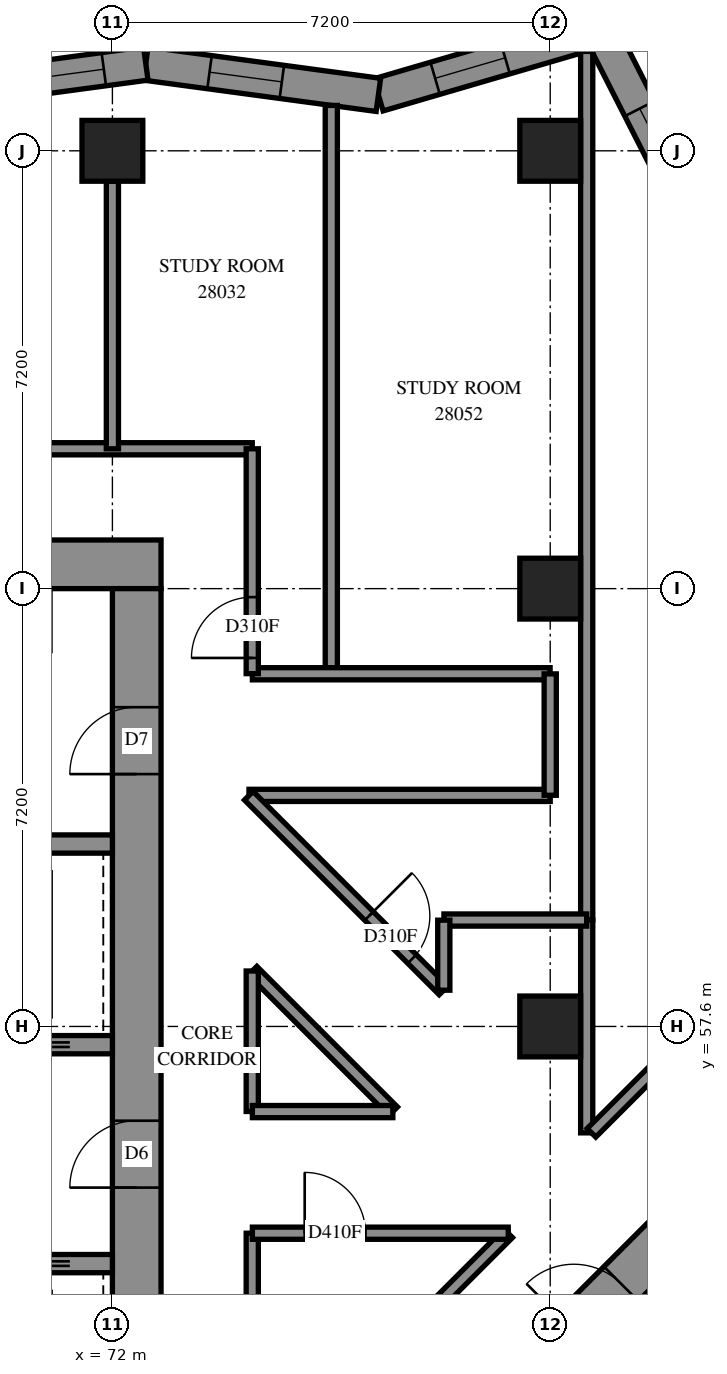
"""IFC4 building model, lengths in metres.
Left out: names, types, materials, properties, quantities, classifications, styles, units other than length and angle.
Written with IfcOpenShell. Run it as: python <this file> out.ifc"""

import sys

from ifc_helpers import new_model, si_unit, direction, frame, frame_2d, origin, origin_2d, place, context, subcontext, project, spatial, polyline, rectangle, outline, extrude, element, fill, save


model = new_model("IFC4")
c1 = context("Model", 3, precision=1e-05, world=origin(), true_north=direction((0.0, 1.0)))
c2 = subcontext(c1, "Body", "Model", "MODEL_VIEW")
j1 = project(units=[si_unit("LENGTHUNIT", "METRE"), si_unit("PLANEANGLEUNIT", "RADIAN")], contexts=[c1])
p1 = place(None, origin())
s1 = spatial("IfcSite", under=j1, at=p1, CompositionType="ELEMENT")
p2 = place(p1, origin())
s2 = spatial("IfcBuilding", under=s1, at=p2, CompositionType="ELEMENT")
p3 = place(p2, frame((0.0, 0.0, 105.0)))
s3 = spatial("IfcBuildingStorey", under=s2, at=p3, CompositionType="ELEMENT", Elevation=105.0)
for number, where, z_axis, x_axis in (
    (1, (72.0, 72.0, 0.0), (0.0, 0.0, 1.0), (1.0, 0.0, 0.0)),
    (2, (79.2, 57.6, 0.0), (0.0, 0.0, 1.0), (1.0, 0.0, 0.0)),
    (3, (79.2, 64.8, 0.0), (0.0, 0.0, 1.0), (1.0, 0.0, 0.0)),
    (4, (79.2, 72.0, 0.0), (0.0, 0.0, 1.0), (1.0, 0.0, 0.0)),
):
    element("IfcColumn", number, at=place(p3, frame(where, z_axis=z_axis, x_axis=x_axis)), inside=s3, PredefinedType="COLUMN", context=c2, shape_type="SweptSolid", body=[
        extrude(rectangle(XDim=1.0, YDim=1.0, at=origin_2d()), origin(), (0.0, 0.0, 1.0), 3.1),
    ])
p4 = place(p3, frame((56.8, 65.2, -0.3), z_axis=(0.0, 0.0, 1.0), x_axis=(1.0, 0.0, 0.0)))
e5 = element("IfcWall", 5, at=p4, inside=s3, PredefinedType="SHEAR", context=c2, shape_type="SweptSolid", body=[
    extrude(rectangle(XDim=16.0, YDim=0.8, at=frame_2d((8.0, 0.0))), origin(), (0.0, 0.0, 1.0), 2.7),
])
p5 = place(p4, frame((10.8, 0.0, 0.3)))
e6 = element("IfcOpeningElement", 6, at=p5, cuts=e5, PredefinedType="OPENING", context=c2, shape_type="SweptSolid", body=[
    extrude(rectangle(XDim=0.8, YDim=2.1, at=frame_2d((0.4, 1.05))), frame((0.0, 0.41, 0.0), z_axis=(0.0, -1.0, 0.0), x_axis=(1.0, 0.0, 0.0)), (0.0, 0.0, 1.0), 0.82),
])
p6 = place(p3, frame((72.4, 50.4, -0.3), z_axis=(0.0, 0.0, 1.0), x_axis=(0.0, 1.0, 0.0)))
e7 = element("IfcWall", 7, at=p6, inside=s3, PredefinedType="SHEAR", context=c2, shape_type="SweptSolid", body=[
    extrude(rectangle(XDim=14.4, YDim=0.8, at=frame_2d((7.2, 0.0))), origin(), (0.0, 0.0, 1.0), 2.7),
])
p7 = place(p6, frame((4.55, 0.0, 0.3)))
e8 = element("IfcOpeningElement", 8, at=p7, cuts=e7, PredefinedType="OPENING", context=c2, shape_type="SweptSolid", body=[
    extrude(rectangle(XDim=1.1, YDim=2.1, at=frame_2d((0.55, 1.05))), frame((0.0, 0.41, 0.0), z_axis=(0.0, -1.0, 0.0), x_axis=(1.0, 0.0, 0.0)), (0.0, 0.0, 1.0), 0.82),
])
p8 = place(p6, frame((11.35, 0.0, 0.3)))
e9 = element("IfcOpeningElement", 9, at=p8, cuts=e7, PredefinedType="OPENING", context=c2, shape_type="SweptSolid", body=[
    extrude(rectangle(XDim=1.1, YDim=2.1, at=frame_2d((0.55, 1.05))), frame((0.0, 0.41, 0.0), z_axis=(0.0, -1.0, 0.0), x_axis=(1.0, 0.0, 0.0)), (0.0, 0.0, 1.0), 0.82),
])
p9 = place(p3, frame((57.6, 53.7, 0.0), z_axis=(0.0, 0.0, 1.0), x_axis=(1.0, 0.0, 0.0)))
e10 = element("IfcWall", 10, at=p9, inside=s3, PredefinedType="SOLIDWALL", context=c2, shape_type="SweptSolid", body=[
    extrude(rectangle(XDim=14.4, YDim=0.3, at=frame_2d((7.2, 0.0))), origin(), (0.0, 0.0, 1.0), 3.1),
])
p10 = place(p9, frame((1.25, 0.0, 0.0)))
e11 = element("IfcOpeningElement", 11, at=p10, cuts=e10, PredefinedType="OPENING", context=c2, shape_type="SweptSolid", body=[
    extrude(rectangle(XDim=1.1, YDim=2.1, at=frame_2d((0.55, 1.05))), frame((0.0, 0.16, 0.0), z_axis=(0.0, -1.0, 0.0), x_axis=(1.0, 0.0, 0.0)), (0.0, 0.0, 1.0), 0.32),
])
p11 = place(p9, frame((4.85, 0.0, 0.0)))
e12 = element("IfcOpeningElement", 12, at=p11, cuts=e10, PredefinedType="OPENING", context=c2, shape_type="SweptSolid", body=[
    extrude(rectangle(XDim=1.1, YDim=2.1, at=frame_2d((0.55, 1.05))), frame((0.0, 0.16, 0.0), z_axis=(0.0, -1.0, 0.0), x_axis=(1.0, 0.0, 0.0)), (0.0, 0.0, 1.0), 0.32),
])
p12 = place(p9, frame((8.45, 0.0, 0.0)))
e13 = element("IfcOpeningElement", 13, at=p12, cuts=e10, PredefinedType="OPENING", context=c2, shape_type="SweptSolid", body=[
    extrude(rectangle(XDim=1.1, YDim=2.1, at=frame_2d((0.55, 1.05))), frame((0.0, 0.16, 0.0), z_axis=(0.0, -1.0, 0.0), x_axis=(1.0, 0.0, 0.0)), (0.0, 0.0, 1.0), 0.32),
])
p13 = place(p9, frame((12.05, 0.0, 0.0)))
e14 = element("IfcOpeningElement", 14, at=p13, cuts=e10, PredefinedType="OPENING", context=c2, shape_type="SweptSolid", body=[
    extrude(rectangle(XDim=1.1, YDim=2.1, at=frame_2d((0.55, 1.05))), frame((0.0, 0.16, 0.0), z_axis=(0.0, -1.0, 0.0), x_axis=(1.0, 0.0, 0.0)), (0.0, 0.0, 1.0), 0.32),
])
p14 = place(p3, frame((57.6, 57.3, 0.0), z_axis=(0.0, 0.0, 1.0), x_axis=(1.0, 0.0, 0.0)))
e15 = element("IfcWall", 15, at=p14, inside=s3, PredefinedType="SOLIDWALL", context=c2, shape_type="SweptSolid", body=[
    extrude(rectangle(XDim=14.4, YDim=0.3, at=frame_2d((7.2, 0.0))), origin(), (0.0, 0.0, 1.0), 3.1),
])
p15 = place(p14, frame((12.05, 0.0, 0.0)))
e16 = element("IfcOpeningElement", 16, at=p15, cuts=e15, PredefinedType="OPENING", context=c2, shape_type="SweptSolid", body=[
    extrude(rectangle(XDim=1.1, YDim=2.1, at=frame_2d((0.55, 1.05))), frame((0.0, 0.16, 0.0), z_axis=(0.0, -1.0, 0.0), x_axis=(1.0, 0.0, 0.0)), (0.0, 0.0, 1.0), 0.32),
])
p16 = place(p3, frame((64.8, 60.6, 0.0), z_axis=(0.0, 0.0, 1.0), x_axis=(1.0, 0.0, 0.0)))
e17 = element("IfcWall", 17, at=p16, inside=s3, PredefinedType="SOLIDWALL", context=c2, shape_type="SweptSolid", body=[
    extrude(rectangle(XDim=7.2, YDim=0.3, at=frame_2d((3.6, 0.0))), origin(), (0.0, 0.0, 1.0), 3.1),
])
p17 = place(p3, frame((76.372, 49.373, -0.3), z_axis=(0.0, 0.0, 1.0), x_axis=(0.7071067812, 0.7071067812, 0.0)))
e18 = element("IfcWall", 18, at=p17, inside=s3, PredefinedType="SHEAR", context=c2, shape_type="SweptSolid", body=[
    extrude(rectangle(XDim=14.4, YDim=0.8, at=frame_2d((7.2, 0.0))), origin(), (0.0, 0.0, 1.0), 2.7),
])
p18 = place(p17, frame((4.55, 0.0, 0.3)))
e19 = element("IfcOpeningElement", 19, at=p18, cuts=e18, PredefinedType="OPENING", context=c2, shape_type="SweptSolid", body=[
    extrude(rectangle(XDim=1.1, YDim=2.1, at=frame_2d((0.55, 1.05))), frame((0.0, 0.41, 0.0), z_axis=(0.0, -1.0, 0.0), x_axis=(1.0, 0.0, 0.0)), (0.0, 0.0, 1.0), 0.82),
])
p19 = place(p17, frame((11.35, 0.0, 0.3)))
e20 = element("IfcOpeningElement", 20, at=p19, cuts=e18, PredefinedType="OPENING", context=c2, shape_type="SweptSolid", body=[
    extrude(rectangle(XDim=1.1, YDim=2.1, at=frame_2d((0.55, 1.05))), frame((0.0, 0.41, 0.0), z_axis=(0.0, -1.0, 0.0), x_axis=(1.0, 0.0, 0.0)), (0.0, 0.0, 1.0), 0.82),
])
p20 = place(p3, frame((81.568, 70.931, 0.0), z_axis=(0.0, 0.0, 1.0), x_axis=(-0.4531369623, 0.8914409085, 0.0)))
e21 = element("IfcWall", 21, at=p20, inside=s3, PredefinedType="SOLIDWALL", context=c2, shape_type="SweptSolid", body=[
    extrude(outline(polyline([(0.065, -0.275), (3.653, -0.275), (3.197, 0.275), (-0.065, 0.275), (0.065, -0.275)])), origin(), (0.0, 0.0, 1.0), 3.1),
])
p21 = place(p20, frame((0.778, 0.0, 0.5)))
e22 = element("IfcOpeningElement", 22, at=p21, cuts=e21, PredefinedType="OPENING", context=c2, shape_type="SweptSolid", body=[
    extrude(rectangle(XDim=1.2, YDim=2.45, at=frame_2d((0.6, 1.225))), frame((0.0, 0.285, 0.0), z_axis=(0.0, -1.0, 0.0), x_axis=(1.0, 0.0, 0.0)), (0.0, 0.0, 1.0), 0.57),
])
p22 = place(p3, frame((80.016, 73.984, 0.0), z_axis=(0.0, 0.0, 1.0), x_axis=(-0.959842199, -0.2805404659, 0.0)))
e23 = element("IfcWall", 23, at=p22, inside=s3, PredefinedType="SOLIDWALL", context=c2, shape_type="SweptSolid", body=[
    extrude(outline(polyline([(-0.228, -0.275), (3.735, -0.275), (3.852, 0.275), (0.228, 0.275), (-0.228, -0.275)])), origin(), (0.0, 0.0, 1.0), 3.1),
])
p23 = place(p22, frame((1.622, 0.0, 0.5)))
e24 = element("IfcOpeningElement", 24, at=p23, cuts=e23, PredefinedType="OPENING", context=c2, shape_type="SweptSolid", body=[
    extrude(rectangle(XDim=1.2, YDim=2.45, at=frame_2d((0.6, 1.225))), frame((0.0, 0.285, 0.0), z_axis=(0.0, -1.0, 0.0), x_axis=(1.0, 0.0, 0.0)), (0.0, 0.0, 1.0), 0.57),
])
p24 = place(p3, frame((76.374, 72.92, 0.0), z_axis=(0.0, 0.0, 1.0), x_axis=(-0.9910665233, 0.1333684607, 0.0)))
e25 = element("IfcWall", 25, at=p24, inside=s3, PredefinedType="SOLIDWALL", context=c2, shape_type="SweptSolid", body=[
    extrude(outline(polyline([(0.058, -0.275), (3.897, -0.275), (3.823, 0.275), (-0.058, 0.275), (0.058, -0.275)])), origin(), (0.0, 0.0, 1.0), 3.1),
])
p25 = place(p24, frame((1.602, 0.0, 0.5)))
e26 = element("IfcOpeningElement", 26, at=p25, cuts=e25, PredefinedType="OPENING", context=c2, shape_type="SweptSolid", body=[
    extrude(rectangle(XDim=1.2, YDim=2.45, at=frame_2d((0.6, 1.225))), frame((0.0, 0.285, 0.0), z_axis=(0.0, -1.0, 0.0), x_axis=(1.0, 0.0, 0.0)), (0.0, 0.0, 1.0), 0.57),
])
p26 = place(p3, frame((72.549, 73.434, 0.0), z_axis=(0.0, 0.0, 1.0), x_axis=(-0.9910651652, -0.1333785524, 0.0)))
e27 = element("IfcWall", 27, at=p26, inside=s3, PredefinedType="SOLIDWALL", context=c2, shape_type="SweptSolid", body=[
    extrude(outline(polyline([(-0.037, -0.275), (3.802, -0.275), (3.876, 0.275), (0.037, 0.275), (-0.037, -0.275)])), origin(), (0.0, 0.0, 1.0), 3.1),
])
p27 = place(p26, frame((0.696, 0.0, 0.5)))
e28 = element("IfcOpeningElement", 28, at=p27, cuts=e27, PredefinedType="OPENING", context=c2, shape_type="SweptSolid", body=[
    extrude(rectangle(XDim=1.3, YDim=2.45, at=frame_2d((0.65, 1.225))), frame((0.0, 0.285, 0.0), z_axis=(0.0, -1.0, 0.0), x_axis=(1.0, 0.0, 0.0)), (0.0, 0.0, 1.0), 0.57),
])
p28 = place(p26, frame((2.196, 0.0, 0.5)))
e29 = element("IfcOpeningElement", 29, at=p28, cuts=e27, PredefinedType="OPENING", context=c2, shape_type="SweptSolid", body=[
    extrude(rectangle(XDim=1.3, YDim=2.45, at=frame_2d((0.65, 1.225))), frame((0.0, 0.285, 0.0), z_axis=(0.0, -1.0, 0.0), x_axis=(1.0, 0.0, 0.0)), (0.0, 0.0, 1.0), 0.57),
])
p29 = place(p3, frame((55.3, 67.1, 0.0), z_axis=(0.0, 0.0, 1.0), x_axis=(1.0, 0.0, 0.0)))
e30 = element("IfcWall", 30, at=p29, inside=s3, PredefinedType="PARTITIONING", context=c2, shape_type="SweptSolid", body=[
    extrude(rectangle(XDim=19.0, YDim=0.2, at=frame_2d((9.5, 0.0))), origin(), (0.0, 0.0, 1.0), 3.1),
])
p30 = place(p29, frame((6.199, 0.0, 0.0)))
e31 = element("IfcOpeningElement", 31, at=p30, cuts=e30, PredefinedType="OPENING", context=c2, shape_type="SweptSolid", body=[
    extrude(rectangle(XDim=0.9, YDim=2.1, at=frame_2d((0.45, 1.05))), frame((0.0, 0.11, 0.0), z_axis=(0.0, -1.0, 0.0), x_axis=(1.0, 0.0, 0.0)), (0.0, 0.0, 1.0), 0.22),
])
p31 = place(p29, frame((13.399, 0.0, 0.0)))
e32 = element("IfcOpeningElement", 32, at=p31, cuts=e30, PredefinedType="OPENING", context=c2, shape_type="SweptSolid", body=[
    extrude(rectangle(XDim=0.9, YDim=2.1, at=frame_2d((0.45, 1.05))), frame((0.0, 0.11, 0.0), z_axis=(0.0, -1.0, 0.0), x_axis=(1.0, 0.0, 0.0)), (0.0, 0.0, 1.0), 0.22),
])
p32 = place(p3, frame((79.8, 59.35, 0.0), z_axis=(0.0, 0.0, 1.0), x_axis=(0.0, 1.0, 0.0)))
e33 = element("IfcWall", 33, at=p32, inside=s3, PredefinedType="PARTITIONING", context=c2, shape_type="SweptSolid", body=[
    extrude(rectangle(XDim=14.284, YDim=0.2, at=frame_2d((7.142, 0.0))), origin(), (0.0, 0.0, 1.0), 3.1),
])
p33 = place(p3, frame((75.6, 63.4, 0.0), z_axis=(0.0, 0.0, 1.0), x_axis=(0.0, 1.0, 0.0)))
e34 = element("IfcWall", 34, at=p33, inside=s3, PredefinedType="PARTITIONING", context=c2, shape_type="SweptSolid", body=[
    extrude(rectangle(XDim=9.346, YDim=0.2, at=frame_2d((4.673, 0.0))), origin(), (0.0, 0.0, 1.0), 3.1),
])
p34 = place(p3, frame((74.301, 49.991, 0.0), z_axis=(0.0, 0.0, 1.0), x_axis=(0.7071067812, 0.7071067812, 0.0)))
e35 = element("IfcWall", 35, at=p34, inside=s3, PredefinedType="PARTITIONING", context=c2, shape_type="SweptSolid", body=[
    extrude(rectangle(XDim=5.951, YDim=0.2, at=frame_2d((2.975, 0.0))), origin(), (0.0, 0.0, 1.0), 3.1),
])
p35 = place(p3, frame((74.246, 61.4, 0.0), z_axis=(0.0, 0.0, 1.0), x_axis=(1.0, 0.0, 0.0)))
e36 = element("IfcWall", 36, at=p35, inside=s3, PredefinedType="PARTITIONING", context=c2, shape_type="SweptSolid", body=[
    extrude(rectangle(XDim=4.954, YDim=0.2, at=frame_2d((2.477, 0.0))), origin(), (0.0, 0.0, 1.0), 3.1),
])
p36 = place(p3, frame((74.302, 63.4, 0.0), z_axis=(0.0, 0.0, 1.0), x_axis=(1.0, 0.0, 0.0)))
e37 = element("IfcWall", 37, at=p36, inside=s3, PredefinedType="PARTITIONING", context=c2, shape_type="SweptSolid", body=[
    extrude(rectangle(XDim=4.896, YDim=0.2, at=frame_2d((2.448, 0.0))), origin(), (0.0, 0.0, 1.0), 3.1),
])
p37 = place(p3, frame((74.243, 61.395, 0.0), z_axis=(0.0, 0.0, 1.0), x_axis=(0.7071067812, -0.7071067812, 0.0)))
e38 = element("IfcWall", 38, at=p37, inside=s3, PredefinedType="PARTITIONING", context=c2, shape_type="SweptSolid", body=[
    extrude(rectangle(XDim=4.528, YDim=0.2, at=frame_2d((2.264, 0.0))), origin(), (0.0, 0.0, 1.0), 3.1),
])
p38 = place(p37, frame((2.797, 0.0, 0.0)))
e39 = element("IfcOpeningElement", 39, at=p38, cuts=e38, PredefinedType="OPENING", context=c2, shape_type="SweptSolid", body=[
    extrude(rectangle(XDim=1.0, YDim=2.1, at=frame_2d((0.5, 1.05))), frame((0.0, 0.11, 0.0), z_axis=(0.0, -1.0, 0.0), x_axis=(1.0, 0.0, 0.0)), (0.0, 0.0, 1.0), 0.22),
])
p39 = place(p3, frame((72.0, 67.1, 0.0), z_axis=(0.0, 0.0, 1.0), x_axis=(0.0, 1.0, 0.0)))
e40 = element("IfcWall", 40, at=p39, inside=s3, PredefinedType="PARTITIONING", context=c2, shape_type="SweptSolid", body=[
    extrude(rectangle(XDim=4.4, YDim=0.2, at=frame_2d((2.2, 0.0))), origin(), (0.0, 0.0, 1.0), 3.1),
])
p40 = place(p3, frame((74.3, 49.99, 0.0), z_axis=(0.0, 0.0, 1.0), x_axis=(0.0, 1.0, 0.0)))
e41 = element("IfcWall", 41, at=p40, inside=s3, PredefinedType="PARTITIONING", context=c2, shape_type="SweptSolid", body=[
    extrude(rectangle(XDim=4.21, YDim=0.2, at=frame_2d((2.105, 0.0))), origin(), (0.0, 0.0, 1.0), 3.1),
])
p41 = place(p3, frame((74.302, 54.2, 0.0), z_axis=(0.0, 0.0, 1.0), x_axis=(1.0, 0.0, 0.0)))
e42 = element("IfcWall", 42, at=p41, inside=s3, PredefinedType="PARTITIONING", context=c2, shape_type="SweptSolid", body=[
    extrude(rectangle(XDim=4.208, YDim=0.2, at=frame_2d((2.104, 0.0))), origin(), (0.0, 0.0, 1.0), 3.1),
])
p42 = place(p41, frame((0.86, 0.0, 0.0)))
e43 = element("IfcOpeningElement", 43, at=p42, cuts=e42, PredefinedType="OPENING", context=c2, shape_type="SweptSolid", body=[
    extrude(rectangle(XDim=1.0, YDim=2.1, at=frame_2d((0.5, 1.05))), frame((0.0, 0.11, 0.0), z_axis=(0.0, -1.0, 0.0), x_axis=(1.0, 0.0, 0.0)), (0.0, 0.0, 1.0), 0.22),
])
p43 = place(p3, frame((74.3, 63.402, 0.0), z_axis=(0.0, 0.0, 1.0), x_axis=(0.0, 1.0, 0.0)))
e44 = element("IfcWall", 44, at=p43, inside=s3, PredefinedType="PARTITIONING", context=c2, shape_type="SweptSolid", body=[
    extrude(rectangle(XDim=3.698, YDim=0.2, at=frame_2d((1.849, 0.0))), origin(), (0.0, 0.0, 1.0), 3.1),
])
p44 = place(p43, frame((0.258, 0.0, 0.0)))
e45 = element("IfcOpeningElement", 45, at=p44, cuts=e44, PredefinedType="OPENING", context=c2, shape_type="SweptSolid", body=[
    extrude(rectangle(XDim=1.0, YDim=2.1, at=frame_2d((0.5, 1.05))), frame((0.0, 0.11, 0.0), z_axis=(0.0, -1.0, 0.0), x_axis=(1.0, 0.0, 0.0)), (0.0, 0.0, 1.0), 0.22),
])
p45 = place(p3, frame((79.8, 55.85, 0.0), z_axis=(0.0, 0.0, 1.0), x_axis=(0.0, 1.0, 0.0)))
e46 = element("IfcWall", 46, at=p45, inside=s3, PredefinedType="PARTITIONING", context=c2, shape_type="SweptSolid", body=[
    extrude(rectangle(XDim=3.5, YDim=0.2, at=frame_2d((1.75, 0.0))), origin(), (0.0, 0.0, 1.0), 3.1),
])
p46 = place(p3, frame((74.305, 58.517, 0.0), z_axis=(0.0, 0.0, 1.0), x_axis=(0.7071067812, -0.7071067812, 0.0)))
e47 = element("IfcWall", 47, at=p46, inside=s3, PredefinedType="PARTITIONING", context=c2, shape_type="SweptSolid", body=[
    extrude(rectangle(XDim=3.27, YDim=0.2, at=frame_2d((1.635, 0.0))), origin(), (0.0, 0.0, 1.0), 3.1),
])
p47 = place(p3, frame((77.452, 59.35, 0.0), z_axis=(0.0, 0.0, 1.0), x_axis=(1.0, 0.0, 0.0)))
e48 = element("IfcWall", 48, at=p47, inside=s3, PredefinedType="PARTITIONING", context=c2, shape_type="SweptSolid", body=[
    extrude(rectangle(XDim=2.348, YDim=0.2, at=frame_2d((1.174, 0.0))), origin(), (0.0, 0.0, 1.0), 3.1),
])
for number, where, z_axis, x_axis in (
    (49, (74.3, 56.202, 0.0), (0.0, 0.0, 1.0), (0.0, 1.0, 0.0)),
    (50, (74.302, 56.2, 0.0), (0.0, 0.0, 1.0), (1.0, 0.0, 0.0)),
):
    element("IfcWall", number, at=place(p3, frame(where, z_axis=z_axis, x_axis=x_axis)), inside=s3, PredefinedType="PARTITIONING", context=c2, shape_type="SweptSolid", body=[
        extrude(rectangle(XDim=2.31, YDim=0.2, at=frame_2d((1.155, 0.0))), origin(), (0.0, 0.0, 1.0), 3.1),
    ])
p48 = place(p3, frame((79.2, 61.402, 0.0), z_axis=(0.0, 0.0, 1.0), x_axis=(0.0, 1.0, 0.0)))
e51 = element("IfcWall", 51, at=p48, inside=s3, PredefinedType="PARTITIONING", context=c2, shape_type="SweptSolid", body=[
    extrude(rectangle(XDim=1.996, YDim=0.2, at=frame_2d((0.998, 0.0))), origin(), (0.0, 0.0, 1.0), 3.1),
])
p49 = place(p3, frame((79.879, 55.851, 0.0), z_axis=(0.0, 0.0, 1.0), x_axis=(0.7071067812, 0.7071067812, 0.0)))
e52 = element("IfcWall", 52, at=p49, inside=s3, PredefinedType="PARTITIONING", context=c2, shape_type="SweptSolid", body=[
    extrude(rectangle(XDim=1.513, YDim=0.2, at=frame_2d((0.757, 0.0))), origin(), (0.0, 0.0, 1.0), 3.1),
])
p50 = place(p3, frame((77.45, 58.196, 0.0), z_axis=(0.0, 0.0, 1.0), x_axis=(0.0, 1.0, 0.0)))
e53 = element("IfcWall", 53, at=p50, inside=s3, PredefinedType="PARTITIONING", context=c2, shape_type="SweptSolid", body=[
    extrude(rectangle(XDim=1.152, YDim=0.2, at=frame_2d((0.576, 0.0))), origin(), (0.0, 0.0, 1.0), 3.1),
])
p51 = place(p21, origin())
e54 = element("IfcWindow", 54, at=p51, inside=s3, PartitioningType="SINGLE_PANEL", PredefinedType="WINDOW", context=c2, shape_type="SweptSolid", body=[
    extrude(rectangle(XDim=1.2, YDim=2.45, at=frame_2d((0.6, 1.225))), frame((0.0, 0.155, 0.0), z_axis=(0.0, -1.0, 0.0), x_axis=(1.0, 0.0, 0.0)), (0.0, 0.0, 1.0), 0.06),
])
fill(e22, e54)
p52 = place(p23, origin())
e55 = element("IfcWindow", 55, at=p52, inside=s3, PartitioningType="SINGLE_PANEL", PredefinedType="WINDOW", context=c2, shape_type="SweptSolid", body=[
    extrude(rectangle(XDim=1.2, YDim=2.45, at=frame_2d((0.6, 1.225))), frame((0.0, 0.155, 0.0), z_axis=(0.0, -1.0, 0.0), x_axis=(1.0, 0.0, 0.0)), (0.0, 0.0, 1.0), 0.06),
])
fill(e24, e55)
p53 = place(p25, origin())
e56 = element("IfcWindow", 56, at=p53, inside=s3, PartitioningType="SINGLE_PANEL", PredefinedType="WINDOW", context=c2, shape_type="SweptSolid", body=[
    extrude(rectangle(XDim=1.2, YDim=2.45, at=frame_2d((0.6, 1.225))), frame((0.0, 0.155, 0.0), z_axis=(0.0, -1.0, 0.0), x_axis=(1.0, 0.0, 0.0)), (0.0, 0.0, 1.0), 0.06),
])
fill(e26, e56)
p54 = place(p27, origin())
e57 = element("IfcWindow", 57, at=p54, inside=s3, PartitioningType="SINGLE_PANEL", PredefinedType="WINDOW", context=c2, shape_type="SweptSolid", body=[
    extrude(rectangle(XDim=1.3, YDim=2.45, at=frame_2d((0.65, 1.225))), frame((0.0, 0.155, 0.0), z_axis=(0.0, -1.0, 0.0), x_axis=(1.0, 0.0, 0.0)), (0.0, 0.0, 1.0), 0.06),
])
fill(e28, e57)
p55 = place(p7, origin())
e58 = element("IfcDoor", 58, at=p55, inside=s3, OperationType="DOUBLE_DOOR_SINGLE_SWING", PredefinedType="DOOR", context=c2, shape_type="SweptSolid", body=[
    extrude(rectangle(XDim=1.1, YDim=2.1, at=frame_2d((0.55, 1.05))), frame((0.0, 0.025, 0.0), z_axis=(0.0, -1.0, 0.0), x_axis=(1.0, 0.0, 0.0)), (0.0, 0.0, 1.0), 0.05),
])
fill(e8, e58)
p56 = place(p8, origin())
e59 = element("IfcDoor", 59, at=p56, inside=s3, OperationType="SINGLE_SWING_RIGHT", PredefinedType="DOOR", context=c2, shape_type="SweptSolid", body=[
    extrude(rectangle(XDim=1.1, YDim=2.1, at=frame_2d((0.55, 1.05))), frame((0.0, 0.025, 0.0), z_axis=(0.0, -1.0, 0.0), x_axis=(1.0, 0.0, 0.0)), (0.0, 0.0, 1.0), 0.05),
])
fill(e9, e59)
p57 = place(p18, origin())
e60 = element("IfcDoor", 60, at=p57, inside=s3, OperationType="DOUBLE_DOOR_SINGLE_SWING", PredefinedType="DOOR", context=c2, shape_type="SweptSolid", body=[
    extrude(rectangle(XDim=1.1, YDim=2.1, at=frame_2d((0.55, 1.05))), frame((0.0, 0.025, 0.0), z_axis=(0.0, -1.0, 0.0), x_axis=(1.0, 0.0, 0.0)), (0.0, 0.0, 1.0), 0.05),
])
fill(e19, e60)
p58 = place(p42, origin())
e61 = element("IfcDoor", 61, at=p58, inside=s3, OperationType="SINGLE_SWING_RIGHT", PredefinedType="DOOR", context=c2, shape_type="SweptSolid", body=[
    extrude(rectangle(XDim=1.0, YDim=2.1, at=frame_2d((0.5, 1.05))), frame((0.0, 0.025, 0.0), z_axis=(0.0, -1.0, 0.0), x_axis=(1.0, 0.0, 0.0)), (0.0, 0.0, 1.0), 0.05),
])
fill(e43, e61)
p59 = place(p44, origin())
e62 = element("IfcDoor", 62, at=p59, inside=s3, OperationType="SINGLE_SWING_RIGHT", PredefinedType="DOOR", context=c2, shape_type="SweptSolid", body=[
    extrude(rectangle(XDim=1.0, YDim=2.1, at=frame_2d((0.5, 1.05))), frame((0.0, 0.025, 0.0), z_axis=(0.0, -1.0, 0.0), x_axis=(1.0, 0.0, 0.0)), (0.0, 0.0, 1.0), 0.05),
])
fill(e45, e62)
p60 = place(p38, origin())
e63 = element("IfcDoor", 63, at=p60, inside=s3, OperationType="SINGLE_SWING_LEFT", PredefinedType="DOOR", context=c2, shape_type="SweptSolid", body=[
    extrude(rectangle(XDim=1.0, YDim=2.1, at=frame_2d((0.5, 1.05))), frame((0.0, 0.025, 0.0), z_axis=(0.0, -1.0, 0.0), x_axis=(1.0, 0.0, 0.0)), (0.0, 0.0, 1.0), 0.05),
])
fill(e39, e63)
save(model, sys.argv[1])
